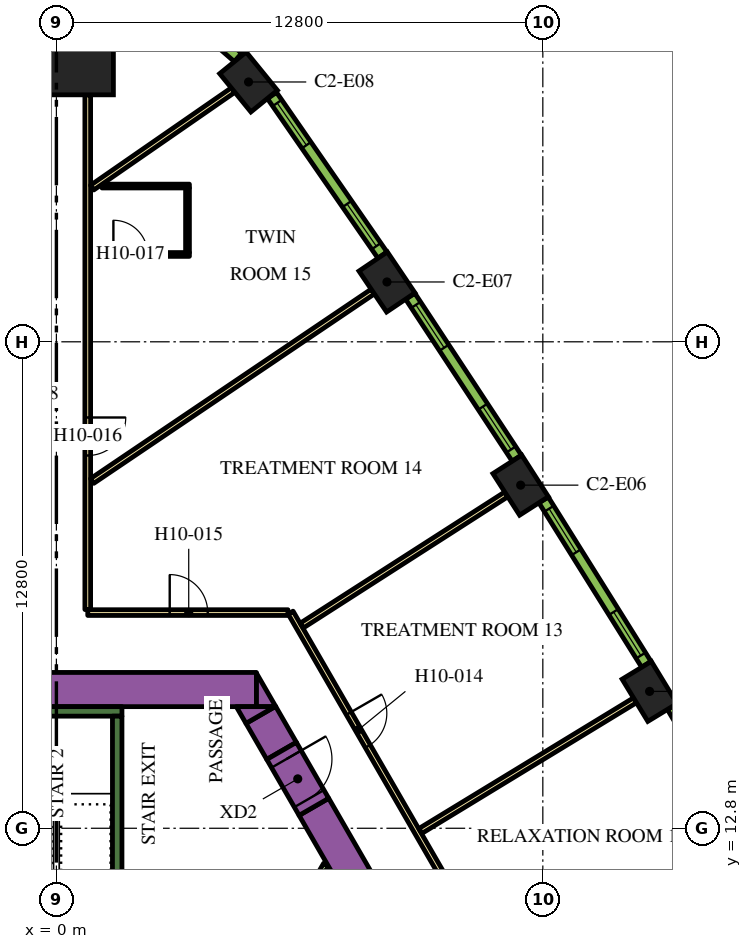
"""IFC4 building model, lengths in metres.
Left out: names, types, materials, properties, quantities, classifications, styles, units other than length and angle.
Written with IfcOpenShell. Run it as: python <this file> out.ifc"""

import sys

from ifc_helpers import new_model, si_unit, direction, frame, frame_2d, origin, origin_2d, place, context, subcontext, project, spatial, polyline, rectangle, outline, extrude, element, fill, save


model = new_model("IFC4")
c1 = context("Model", 3, precision=1e-05, world=origin(), true_north=direction((0.0, 1.0)))
c2 = subcontext(c1, "Body", "Model", "MODEL_VIEW")
j1 = project(units=[si_unit("LENGTHUNIT", "METRE"), si_unit("PLANEANGLEUNIT", "RADIAN")], contexts=[c1])
p1 = place(None, origin())
s1 = spatial("IfcSite", under=j1, at=p1, CompositionType="ELEMENT")
p2 = place(p1, origin())
s2 = spatial("IfcBuilding", under=s1, at=p2, CompositionType="ELEMENT")
p3 = place(p2, frame((0.0, 0.0, 130.5)))
s3 = spatial("IfcBuildingStorey", under=s2, at=p3, CompositionType="ELEMENT", Elevation=130.5)
p4 = place(p3, frame((0.0, 33.598, 0.0), z_axis=(0.0, 0.0, 1.0), x_axis=(0.0, 1.0, 0.0)))
e1 = element("IfcColumn", 1, at=p4, inside=s3, PredefinedType="COLUMN", context=c2, shape_type="SweptSolid", body=[
    extrude(rectangle(XDim=3.0, YDim=3.0, at=origin_2d()), origin(), (0.0, 0.0, 1.0), 3.9),
])
for number, where, z_axis, x_axis in (
    (2, (15.609, 16.402, 0.0), (0.0, 0.0, 1.0), (-0.52, 0.854, 0.0)),
    (3, (12.217, 21.828, 0.0), (0.0, 0.0, 1.0), (-0.54, 0.842, 0.0)),
    (4, (8.699, 27.174, 0.0), (0.0, 0.0, 1.0), (-0.559, 0.829, 0.0)),
    (5, (5.056, 32.437, 0.0), (0.0, 0.0, 1.0), (-0.632, 0.775, 0.0)),
):
    element("IfcColumn", number, at=place(p3, frame(where, z_axis=z_axis, x_axis=x_axis)), inside=s3, PredefinedType="COLUMN", context=c2, shape_type="SweptSolid", body=[
        extrude(rectangle(XDim=1.3, YDim=0.9, at=origin_2d()), origin(), (0.0, 0.0, 1.0), 3.9),
    ])
p5 = place(p3, frame((6.776, 13.364, 0.0), z_axis=(0.0, 0.0, 1.0), x_axis=(0.500004177138, -0.8660229921, 0.0)))
e6 = element("IfcWall", 6, at=p5, inside=s3, PredefinedType="SOLIDWALL", context=c2, shape_type="SweptSolid", body=[
    extrude(rectangle(XDim=20.204, YDim=0.9, at=frame_2d((10.102, 0.0))), origin(), (0.0, 0.0, 1.0), 3.9),
])
p6 = place(p3, frame((-4.224, 16.45, 0.0), z_axis=(0.0, 0.0, 1.0), x_axis=(1.0, 0.0, 0.0)))
e7 = element("IfcWall", 7, at=p6, inside=s3, PredefinedType="SOLIDWALL", context=c2, shape_type="SweptSolid", body=[
    extrude(rectangle(XDim=9.488, YDim=0.9, at=frame_2d((4.744, 0.0))), origin(), (0.0, 0.0, 1.0), 3.9),
])
p7 = place(p3, origin())
e8 = element("IfcWall", 8, at=p7, inside=s3, PredefinedType="SOLIDWALL", context=c2, shape_type="SweptSolid", body=[
    extrude(outline(polyline([(5.265, 16.0), (5.265, 16.88), (5.773, 16.0), (5.265, 16.0)])), origin(), (0.0, 0.0, 1.0), 3.9),
])
p8 = place(p3, frame((5.926, 14.836, 0.0), z_axis=(0.0, 0.0, 1.0), x_axis=(-0.500076735116, 0.865981096212, 0.0)))
e9 = element("IfcWall", 9, at=p8, inside=s3, PredefinedType="SOLIDWALL", context=c2, shape_type="SweptSolid", body=[
    extrude(rectangle(XDim=1.094, YDim=0.9, at=frame_2d((0.547, 0.0))), origin(), (0.0, 0.0, 1.0), 3.9),
])
e10 = element("IfcWall", 10, at=p7, inside=s3, PredefinedType="SOLIDWALL", context=c2, shape_type="SweptSolid", body=[
    extrude(outline(polyline([(4.734, 16.0), (5.75, 16.0), (4.988, 15.56), (4.734, 16.0)])), origin(), (0.0, 0.0, 1.0), 3.9),
])
p9 = place(p3, frame((-1.725, 15.875, 0.0), z_axis=(0.0, 0.0, 1.0), x_axis=(1.0, 0.0, 0.0)))
e11 = element("IfcWall", 11, at=p9, inside=s3, PredefinedType="SOLIDWALL", context=c2, shape_type="SweptSolid", body=[
    extrude(rectangle(XDim=3.45, YDim=0.25, at=frame_2d((1.725, 0.0))), origin(), (0.0, 0.0, 1.0), 3.9),
])
p10 = place(p3, frame((1.6, 8.95, 0.0), z_axis=(0.0, 0.0, 1.0), x_axis=(0.0, 1.0, 0.0)))
e12 = element("IfcWall", 12, at=p10, inside=s3, PredefinedType="SOLIDWALL", context=c2, shape_type="SweptSolid", body=[
    extrude(rectangle(XDim=6.8, YDim=0.25, at=frame_2d((3.4, 0.0))), origin(), (0.0, 0.0, 1.0), 3.9),
])
p11 = place(p3, frame((6.872, 11.45, 0.0), z_axis=(0.0, 0.0, 1.0), x_axis=(0.499846793097, 0.866113839764, 0.0)))
e13 = element("IfcWall", 13, at=p11, inside=s3, PredefinedType="PARTITIONING", context=c2, shape_type="SweptSolid", body=[
    extrude(rectangle(XDim=0.453, YDim=0.15, at=frame_2d((0.227, 0.0))), origin(), (0.0, 0.0, 1.0), 2.6),
])
p12 = place(p3, frame((7.131, 11.6, 0.0), z_axis=(0.0, 0.0, 1.0), x_axis=(0.498600033135, 0.866832167699, 0.0)))
e14 = element("IfcWall", 14, at=p12, inside=s3, PredefinedType="PARTITIONING", context=c2, shape_type="SweptSolid", body=[
    extrude(rectangle(XDim=0.107, YDim=0.15, at=frame_2d((0.053, 0.0))), origin(), (0.0, 0.0, 1.0), 2.6),
])
p13 = place(p3, frame((5.926, 14.836, 0.0), z_axis=(0.0, 0.0, 1.0), x_axis=(0.500062241894, -0.865989465428, 0.0)))
e15 = element("IfcWall", 15, at=p13, inside=s3, PredefinedType="SOLIDWALL", context=c2, shape_type="SweptSolid", body=[
    extrude(rectangle(XDim=1.7, YDim=0.9, at=frame_2d((0.85, 0.0))), origin(), (0.0, 0.0, 1.0), 3.9),
])
p14 = place(p13, frame((0.25, 0.0, 0.0)))
e16 = element("IfcOpeningElement", 16, at=p14, cuts=e15, PredefinedType="OPENING", context=c2, shape_type="SweptSolid", body=[
    extrude(rectangle(XDim=1.2, YDim=2.1, at=frame_2d((0.6, 1.05))), frame((0.0, 0.46, 0.0), z_axis=(0.0, -1.0, 0.0), x_axis=(1.0, 0.0, 0.0)), (0.0, 0.0, 1.0), 0.92),
])
p15 = place(p3, frame((6.163, 18.475, 0.0), z_axis=(0.0, 0.0, 1.0), x_axis=(0.500001317485, -0.866024643133, 0.0)))
e17 = element("IfcWall", 17, at=p15, inside=s3, PredefinedType="PARTITIONING", context=c2, shape_type="SweptSolid", body=[
    extrude(rectangle(XDim=25.767, YDim=0.15, at=frame_2d((12.883, 0.0))), origin(), (0.0, 0.0, 1.0), 2.6),
])
p16 = place(p15, frame((21.774, 0.0, 0.0)))
e18 = element("IfcOpeningElement", 18, at=p16, cuts=e17, PredefinedType="OPENING", context=c2, shape_type="SweptSolid", body=[
    extrude(rectangle(XDim=1.0, YDim=2.1, at=frame_2d((0.5, 1.05))), frame((0.0, 0.085, 0.0), z_axis=(0.0, -1.0, 0.0), x_axis=(1.0, 0.0, 0.0)), (0.0, 0.0, 1.0), 0.17),
])
p17 = place(p15, frame((15.571, 0.0, 0.0)))
e19 = element("IfcOpeningElement", 19, at=p17, cuts=e17, PredefinedType="OPENING", context=c2, shape_type="SweptSolid", body=[
    extrude(rectangle(XDim=1.0, YDim=2.1, at=frame_2d((0.5, 1.05))), frame((0.0, 0.085, 0.0), z_axis=(0.0, -1.0, 0.0), x_axis=(1.0, 0.0, 0.0)), (0.0, 0.0, 1.0), 0.17),
])
p18 = place(p15, frame((9.265, 0.0, 0.0)))
e20 = element("IfcOpeningElement", 20, at=p18, cuts=e17, PredefinedType="OPENING", context=c2, shape_type="SweptSolid", body=[
    extrude(rectangle(XDim=1.0, YDim=2.1, at=frame_2d((0.5, 1.05))), frame((0.0, 0.085, 0.0), z_axis=(0.0, -1.0, 0.0), x_axis=(1.0, 0.0, 0.0)), (0.0, 0.0, 1.0), 0.17),
])
p19 = place(p15, frame((3.063, 0.0, 0.0)))
e21 = element("IfcOpeningElement", 21, at=p19, cuts=e17, PredefinedType="OPENING", context=c2, shape_type="SweptSolid", body=[
    extrude(rectangle(XDim=1.0, YDim=2.1, at=frame_2d((0.5, 1.05))), frame((0.0, 0.085, 0.0), z_axis=(0.0, -1.0, 0.0), x_axis=(1.0, 0.0, 0.0)), (0.0, 0.0, 1.0), 0.17),
])
p20 = place(p3, frame((0.825, 18.475, 0.0), z_axis=(0.0, 0.0, 1.0), x_axis=(1.0, 0.0, 0.0)))
e22 = element("IfcWall", 22, at=p20, inside=s3, PredefinedType="PARTITIONING", context=c2, shape_type="SweptSolid", body=[
    extrude(rectangle(XDim=5.268, YDim=0.15, at=frame_2d((2.634, 0.0))), origin(), (0.0, 0.0, 1.0), 2.6),
])
p21 = place(p20, frame((2.157, 0.0, 0.0)))
e23 = element("IfcOpeningElement", 23, at=p21, cuts=e22, PredefinedType="OPENING", context=c2, shape_type="SweptSolid", body=[
    extrude(rectangle(XDim=1.0, YDim=2.1, at=frame_2d((0.5, 1.05))), frame((0.0, 0.085, 0.0), z_axis=(0.0, -1.0, 0.0), x_axis=(1.0, 0.0, 0.0)), (0.0, 0.0, 1.0), 0.17),
])
p22 = place(p3, frame((0.825, 32.098, 0.0), z_axis=(0.0, 0.0, 1.0), x_axis=(0.0, -1.0, 0.0)))
e24 = element("IfcWall", 24, at=p22, inside=s3, PredefinedType="PARTITIONING", context=c2, shape_type="SweptSolid", body=[
    extrude(rectangle(XDim=13.543, YDim=0.15, at=frame_2d((6.772, 0.0))), origin(), (0.0, 0.0, 1.0), 2.6),
])
p23 = place(p22, frame((8.49, 0.0, 0.0)))
e25 = element("IfcOpeningElement", 25, at=p23, cuts=e24, PredefinedType="OPENING", context=c2, shape_type="SweptSolid", body=[
    extrude(rectangle(XDim=1.0, YDim=2.1, at=frame_2d((0.5, 1.05))), frame((0.0, 0.085, 0.0), z_axis=(0.0, -1.0, 0.0), x_axis=(1.0, 0.0, 0.0)), (0.0, 0.0, 1.0), 0.17),
])
p24 = place(p3, frame((8.326, 26.923, 0.0), z_axis=(0.0, 0.0, 1.0), x_axis=(-0.828836601893, -0.5594907393, 0.0)))
e26 = element("IfcWall", 26, at=p24, inside=s3, PredefinedType="PARTITIONING", context=c2, shape_type="SweptSolid", body=[
    extrude(rectangle(XDim=8.909, YDim=0.15, at=frame_2d((4.455, 0.0))), origin(), (0.0, 0.0, 1.0), 2.6),
])
p25 = place(p3, frame((4.649, 32.223, 0.0), z_axis=(0.0, 0.0, 1.0), x_axis=(-0.822262349475, -0.569108626394, 0.0)))
e27 = element("IfcWall", 27, at=p25, inside=s3, PredefinedType="PARTITIONING", context=c2, shape_type="SweptSolid", body=[
    extrude(rectangle(XDim=4.51, YDim=0.15, at=frame_2d((2.255, 0.0))), origin(), (0.0, 0.0, 1.0), 2.6),
])
p26 = place(p3, frame((11.838, 21.585, 0.0), z_axis=(0.0, 0.0, 1.0), x_axis=(-0.841699322813, -0.539946525108, 0.0)))
e28 = element("IfcWall", 28, at=p26, inside=s3, PredefinedType="PARTITIONING", context=c2, shape_type="SweptSolid", body=[
    extrude(rectangle(XDim=6.392, YDim=0.15, at=frame_2d((3.196, 0.0))), origin(), (0.0, 0.0, 1.0), 2.6),
])
p27 = place(p3, frame((15.225, 16.167, 0.0), z_axis=(0.0, 0.0, 1.0), x_axis=(-0.854088713274, -0.520127359266, 0.0)))
e29 = element("IfcWall", 29, at=p27, inside=s3, PredefinedType="PARTITIONING", context=c2, shape_type="SweptSolid", body=[
    extrude(rectangle(XDim=6.611, YDim=0.15, at=frame_2d((3.305, 0.0))), origin(), (0.0, 0.0, 1.0), 2.6),
])
p28 = place(p3, frame((0.9, 27.898, 0.0), z_axis=(0.0, 0.0, 1.0), x_axis=(1.0, 0.0, 0.0)))
e30 = element("IfcWall", 30, at=p28, inside=s3, PredefinedType="PARTITIONING", context=c2, shape_type="SweptSolid", body=[
    extrude(rectangle(XDim=2.6, YDim=0.1, at=frame_2d((1.3, 0.0))), origin(), (0.0, 0.0, 1.0), 2.6),
])
p29 = place(p28, frame((0.6, 0.0, 0.0)))
e31 = element("IfcOpeningElement", 31, at=p29, cuts=e30, PredefinedType="OPENING", context=c2, shape_type="SweptSolid", body=[
    extrude(rectangle(XDim=0.9, YDim=2.1, at=frame_2d((0.45, 1.05))), frame((0.0, 0.06, 0.0), z_axis=(0.0, -1.0, 0.0), x_axis=(1.0, 0.0, 0.0)), (0.0, 0.0, 1.0), 0.12),
])
p30 = place(p3, frame((3.45, 27.948, 0.0), z_axis=(0.0, 0.0, 1.0), x_axis=(0.0, 1.0, 0.0)))
e32 = element("IfcWall", 32, at=p30, inside=s3, PredefinedType="PARTITIONING", context=c2, shape_type="SweptSolid", body=[
    extrude(rectangle(XDim=1.7, YDim=0.1, at=frame_2d((0.85, 0.0))), origin(), (0.0, 0.0, 1.0), 2.6),
])
p31 = place(p3, frame((1.2, 29.698, 0.0), z_axis=(0.0, 0.0, 1.0), x_axis=(1.0, 0.0, 0.0)))
e33 = element("IfcWall", 33, at=p31, inside=s3, PredefinedType="PARTITIONING", context=c2, shape_type="SweptSolid", body=[
    extrude(rectangle(XDim=2.3, YDim=0.1, at=frame_2d((1.15, 0.0))), origin(), (0.0, 0.0, 1.0), 2.6),
])
p32 = place(p3, frame((18.805, 11.611, 0.0), z_axis=(0.0, 0.0, 1.0), x_axis=(-0.510054281659, 0.860142214847, 0.0)))
e34 = element("IfcWall", 34, at=p32, inside=s3, PredefinedType="SOLIDWALL", context=c2, shape_type="SweptSolid", body=[
    extrude(rectangle(XDim=5.101, YDim=0.29, at=frame_2d((2.55, 0.0))), origin(), (0.0, 0.0, 1.0), 3.5),
])
p33 = place(p32, frame((0.273, 0.0, 0.9)))
e35 = element("IfcOpeningElement", 35, at=p33, cuts=e34, PredefinedType="OPENING", context=c2, shape_type="SweptSolid", body=[
    extrude(rectangle(XDim=1.35, YDim=2.15, at=frame_2d((0.675, 1.075))), frame((0.0, 0.155, 0.0), z_axis=(0.0, -1.0, 0.0), x_axis=(1.0, 0.0, 0.0)), (0.0, 0.0, 1.0), 0.31),
])
p34 = place(p32, frame((3.478, 0.0, 0.9)))
e36 = element("IfcOpeningElement", 36, at=p34, cuts=e34, PredefinedType="OPENING", context=c2, shape_type="SweptSolid", body=[
    extrude(rectangle(XDim=1.35, YDim=2.15, at=frame_2d((0.675, 1.075))), frame((0.0, 0.155, 0.0), z_axis=(0.0, -1.0, 0.0), x_axis=(1.0, 0.0, 0.0)), (0.0, 0.0, 1.0), 0.31),
])
p35 = place(p3, frame((15.524, 17.114, 0.0), z_axis=(0.0, 0.0, 1.0), x_axis=(-0.530072082134, 0.847952585787, 0.0)))
e37 = element("IfcWall", 37, at=p35, inside=s3, PredefinedType="SOLIDWALL", context=c2, shape_type="SweptSolid", body=[
    extrude(rectangle(XDim=5.1, YDim=0.29, at=frame_2d((2.55, 0.0))), origin(), (0.0, 0.0, 1.0), 3.5),
])
p36 = place(p35, frame((0.273, 0.0, 0.9)))
e38 = element("IfcOpeningElement", 38, at=p36, cuts=e37, PredefinedType="OPENING", context=c2, shape_type="SweptSolid", body=[
    extrude(rectangle(XDim=1.35, YDim=2.15, at=frame_2d((0.675, 1.075))), frame((0.0, 0.155, 0.0), z_axis=(0.0, -1.0, 0.0), x_axis=(1.0, 0.0, 0.0)), (0.0, 0.0, 1.0), 0.31),
])
p37 = place(p35, frame((3.478, 0.0, 0.9)))
e39 = element("IfcOpeningElement", 39, at=p37, cuts=e37, PredefinedType="OPENING", context=c2, shape_type="SweptSolid", body=[
    extrude(rectangle(XDim=1.35, YDim=2.15, at=frame_2d((0.675, 1.075))), frame((0.0, 0.155, 0.0), z_axis=(0.0, -1.0, 0.0), x_axis=(1.0, 0.0, 0.0)), (0.0, 0.0, 1.0), 0.31),
])
p38 = place(p3, frame((12.115, 22.539, 0.0), z_axis=(0.0, 0.0, 1.0), x_axis=(-0.549741341923, 0.835334937005, 0.0)))
e40 = element("IfcWall", 40, at=p38, inside=s3, PredefinedType="SOLIDWALL", context=c2, shape_type="SweptSolid", body=[
    extrude(rectangle(XDim=5.1, YDim=0.29, at=frame_2d((2.55, 0.0))), origin(), (0.0, 0.0, 1.0), 3.5),
])
p39 = place(p38, frame((0.273, 0.0, 0.9)))
e41 = element("IfcOpeningElement", 41, at=p39, cuts=e40, PredefinedType="OPENING", context=c2, shape_type="SweptSolid", body=[
    extrude(rectangle(XDim=1.35, YDim=2.15, at=frame_2d((0.675, 1.075))), frame((0.0, 0.155, 0.0), z_axis=(0.0, -1.0, 0.0), x_axis=(1.0, 0.0, 0.0)), (0.0, 0.0, 1.0), 0.31),
])
p40 = place(p38, frame((3.478, 0.0, 0.9)))
e42 = element("IfcOpeningElement", 42, at=p40, cuts=e40, PredefinedType="OPENING", context=c2, shape_type="SweptSolid", body=[
    extrude(rectangle(XDim=1.35, YDim=2.15, at=frame_2d((0.675, 1.075))), frame((0.0, 0.155, 0.0), z_axis=(0.0, -1.0, 0.0), x_axis=(1.0, 0.0, 0.0)), (0.0, 0.0, 1.0), 0.31),
])
p41 = place(p3, frame((8.58, 27.882, 0.0), z_axis=(0.0, 0.0, 1.0), x_axis=(-0.569113019126, 0.822259309136, 0.0)))
e43 = element("IfcWall", 43, at=p41, inside=s3, PredefinedType="SOLIDWALL", context=c2, shape_type="SweptSolid", body=[
    extrude(rectangle(XDim=5.107, YDim=0.29, at=frame_2d((2.553, 0.0))), origin(), (0.0, 0.0, 1.0), 3.5),
])
p42 = place(p41, frame((0.285, 0.0, 0.9)))
e44 = element("IfcOpeningElement", 44, at=p42, cuts=e43, PredefinedType="OPENING", context=c2, shape_type="SweptSolid", body=[
    extrude(rectangle(XDim=1.35, YDim=2.15, at=frame_2d((0.675, 1.075))), frame((0.0, 0.155, 0.0), z_axis=(0.0, -1.0, 0.0), x_axis=(1.0, 0.0, 0.0)), (0.0, 0.0, 1.0), 0.31),
])
p43 = place(p41, frame((3.516, 0.0, 0.9)))
e45 = element("IfcOpeningElement", 45, at=p43, cuts=e43, PredefinedType="OPENING", context=c2, shape_type="SweptSolid", body=[
    extrude(rectangle(XDim=1.35, YDim=2.15, at=frame_2d((0.675, 1.075))), frame((0.0, 0.155, 0.0), z_axis=(0.0, -1.0, 0.0), x_axis=(1.0, 0.0, 0.0)), (0.0, 0.0, 1.0), 0.31),
])
p44 = place(p3, frame((4.778, 33.082, 0.0), z_axis=(0.0, 0.0, 1.0), x_axis=(-0.754882764627, 0.655859749999, 0.0)))
e46 = element("IfcWall", 46, at=p44, inside=s3, PredefinedType="SOLIDWALL", context=c2, shape_type="SweptSolid", body=[
    extrude(rectangle(XDim=1.82, YDim=0.29, at=frame_2d((0.91, 0.0))), origin(), (0.0, 0.0, 1.0), 3.5),
])
p45 = place(p44, frame((0.46, 0.0, 0.9)))
e47 = element("IfcOpeningElement", 47, at=p45, cuts=e46, PredefinedType="OPENING", context=c2, shape_type="SweptSolid", body=[
    extrude(rectangle(XDim=0.9, YDim=2.15, at=frame_2d((0.45, 1.075))), frame((0.0, 0.155, 0.0), z_axis=(0.0, -1.0, 0.0), x_axis=(1.0, 0.0, 0.0)), (0.0, 0.0, 1.0), 0.31),
])
p46 = place(p14, origin())
e48 = element("IfcDoor", 48, at=p46, inside=s3, OperationType="SINGLE_SWING_LEFT", PredefinedType="DOOR", context=c2, shape_type="SweptSolid", body=[
    extrude(rectangle(XDim=1.2, YDim=2.1, at=frame_2d((0.6, 1.05))), frame((0.0, 0.025, 0.0), z_axis=(0.0, -1.0, 0.0), x_axis=(1.0, 0.0, 0.0)), (0.0, 0.0, 1.0), 0.05),
])
fill(e16, e48)
p47 = place(p19, origin())
e49 = element("IfcDoor", 49, at=p47, inside=s3, OperationType="SINGLE_SWING_LEFT", PredefinedType="DOOR", context=c2, shape_type="SweptSolid", body=[
    extrude(rectangle(XDim=1.0, YDim=2.1, at=frame_2d((0.5, 1.05))), frame((0.0, 0.025, 0.0), z_axis=(0.0, -1.0, 0.0), x_axis=(1.0, 0.0, 0.0)), (0.0, 0.0, 1.0), 0.05),
])
fill(e21, e49)
p48 = place(p21, origin())
e50 = element("IfcDoor", 50, at=p48, inside=s3, OperationType="SINGLE_SWING_RIGHT", PredefinedType="DOOR", context=c2, shape_type="SweptSolid", body=[
    extrude(rectangle(XDim=1.0, YDim=2.1, at=frame_2d((0.5, 1.05))), frame((0.0, 0.025, 0.0), z_axis=(0.0, -1.0, 0.0), x_axis=(1.0, 0.0, 0.0)), (0.0, 0.0, 1.0), 0.05),
])
fill(e23, e50)
p49 = place(p23, origin())
e51 = element("IfcDoor", 51, at=p49, inside=s3, OperationType="SINGLE_SWING_RIGHT", PredefinedType="DOOR", context=c2, shape_type="SweptSolid", body=[
    extrude(rectangle(XDim=1.0, YDim=2.1, at=frame_2d((0.5, 1.05))), frame((0.0, 0.025, 0.0), z_axis=(0.0, -1.0, 0.0), x_axis=(1.0, 0.0, 0.0)), (0.0, 0.0, 1.0), 0.05),
])
fill(e25, e51)
p50 = place(p29, origin())
e52 = element("IfcDoor", 52, at=p50, inside=s3, OperationType="SINGLE_SWING_RIGHT", PredefinedType="DOOR", context=c2, shape_type="SweptSolid", body=[
    extrude(rectangle(XDim=0.9, YDim=2.1, at=frame_2d((0.45, 1.05))), frame((0.0, 0.025, 0.0), z_axis=(0.0, -1.0, 0.0), x_axis=(1.0, 0.0, 0.0)), (0.0, 0.0, 1.0), 0.05),
])
fill(e31, e52)
p51 = place(p36, origin())
e53 = element("IfcWindow", 53, at=p51, inside=s3, PartitioningType="DOUBLE_PANEL_VERTICAL", PredefinedType="WINDOW", context=c2, shape_type="SweptSolid", body=[
    extrude(rectangle(XDim=1.35, YDim=2.15, at=frame_2d((0.675, 1.075))), frame((0.0, 0.015, 0.0), z_axis=(0.0, -1.0, 0.0), x_axis=(1.0, 0.0, 0.0)), (0.0, 0.0, 1.0), 0.06),
])
fill(e38, e53)
p52 = place(p37, origin())
e54 = element("IfcWindow", 54, at=p52, inside=s3, PartitioningType="DOUBLE_PANEL_VERTICAL", PredefinedType="WINDOW", context=c2, shape_type="SweptSolid", body=[
    extrude(rectangle(XDim=1.35, YDim=2.15, at=frame_2d((0.675, 1.075))), frame((0.0, 0.015, 0.0), z_axis=(0.0, -1.0, 0.0), x_axis=(1.0, 0.0, 0.0)), (0.0, 0.0, 1.0), 0.06),
])
fill(e39, e54)
p53 = place(p39, origin())
e55 = element("IfcWindow", 55, at=p53, inside=s3, PartitioningType="DOUBLE_PANEL_VERTICAL", PredefinedType="WINDOW", context=c2, shape_type="SweptSolid", body=[
    extrude(rectangle(XDim=1.35, YDim=2.15, at=frame_2d((0.675, 1.075))), frame((0.0, 0.015, 0.0), z_axis=(0.0, -1.0, 0.0), x_axis=(1.0, 0.0, 0.0)), (0.0, 0.0, 1.0), 0.06),
])
fill(e41, e55)
p54 = place(p40, origin())
e56 = element("IfcWindow", 56, at=p54, inside=s3, PartitioningType="DOUBLE_PANEL_VERTICAL", PredefinedType="WINDOW", context=c2, shape_type="SweptSolid", body=[
    extrude(rectangle(XDim=1.35, YDim=2.15, at=frame_2d((0.675, 1.075))), frame((0.0, 0.015, 0.0), z_axis=(0.0, -1.0, 0.0), x_axis=(1.0, 0.0, 0.0)), (0.0, 0.0, 1.0), 0.06),
])
fill(e42, e56)
p55 = place(p42, origin())
e57 = element("IfcWindow", 57, at=p55, inside=s3, PartitioningType="DOUBLE_PANEL_VERTICAL", PredefinedType="WINDOW", context=c2, shape_type="SweptSolid", body=[
    extrude(rectangle(XDim=1.35, YDim=2.15, at=frame_2d((0.675, 1.075))), frame((0.0, 0.015, 0.0), z_axis=(0.0, -1.0, 0.0), x_axis=(1.0, 0.0, 0.0)), (0.0, 0.0, 1.0), 0.06),
])
fill(e44, e57)
p56 = place(p43, origin())
e58 = element("IfcWindow", 58, at=p56, inside=s3, PartitioningType="DOUBLE_PANEL_VERTICAL", PredefinedType="WINDOW", context=c2, shape_type="SweptSolid", body=[
    extrude(rectangle(XDim=1.35, YDim=2.15, at=frame_2d((0.675, 1.075))), frame((0.0, 0.015, 0.0), z_axis=(0.0, -1.0, 0.0), x_axis=(1.0, 0.0, 0.0)), (0.0, 0.0, 1.0), 0.06),
])
fill(e45, e58)
save(model, sys.argv[1])
